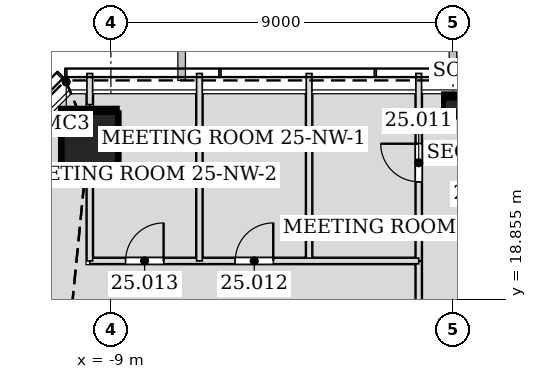
"""IFC4 building model, lengths in metres.
Left out: names, types, materials, properties, quantities, classifications, styles, units other than length and angle.
Written with IfcOpenShell. Run it as: python <this file> out.ifc"""

import sys

from ifc_helpers import new_model, si_unit, direction, frame, frame_2d, origin, origin_2d, place, context, subcontext, project, spatial, rectangle, hollow_rectangle, extrude, element, fill, save


model = new_model("IFC4")
c1 = context("Model", 3, precision=1e-05, world=origin(), true_north=direction((0.0, 1.0)))
c2 = subcontext(c1, "Body", "Model", "MODEL_VIEW")
j1 = project(units=[si_unit("LENGTHUNIT", "METRE"), si_unit("PLANEANGLEUNIT", "RADIAN")], contexts=[c1])
p1 = place(None, origin())
s1 = spatial("IfcSite", under=j1, at=p1, CompositionType="ELEMENT")
p2 = place(p1, origin())
s2 = spatial("IfcBuilding", under=s1, at=p2, CompositionType="ELEMENT")
p3 = place(p2, frame((0.0, 0.0, 113.4)))
s3 = spatial("IfcBuildingStorey", under=s2, at=p3, CompositionType="ELEMENT", Elevation=113.4)
p4 = place(p3, frame((-9.58, 23.129, 0.0), z_axis=(0.011677854952, -0.028294106277, 0.999531425846), x_axis=(0.924363308851, 0.38151339852, 0.0)))
e1 = element("IfcColumn", 1, at=p4, inside=s3, PredefinedType="COLUMN", context=c2, shape_type="SweptSolid", body=[
    extrude(hollow_rectangle(XDim=1.5, YDim=1.5, WallThickness=0.07, at=origin_2d()), origin(), (0.0, 0.0, 1.0), 4.202),
])
p5 = place(p3, frame((0.0, 24.007, 0.0), z_axis=(0.0, -0.02829603574, 0.999599587015), x_axis=(1.0, 0.0, 0.0)))
e2 = element("IfcColumn", 2, at=p5, inside=s3, PredefinedType="COLUMN", context=c2, shape_type="SweptSolid", body=[
    extrude(hollow_rectangle(XDim=0.5, YDim=0.5, WallThickness=0.025, at=origin_2d()), origin(), (0.0, 0.0, 1.0), 4.202),
])
p6 = place(p3, frame((-0.9, 24.791, 0.0), z_axis=(0.0, 0.0, 1.0), x_axis=(0.0, -1.0, 0.0)))
e3 = element("IfcWall", 3, at=p6, inside=s3, PredefinedType="PARTITIONING", context=c2, shape_type="SweptSolid", body=[
    extrude(rectangle(XDim=4.935, YDim=0.15, at=frame_2d((2.468, 0.0))), origin(), (0.0, 0.0, 1.0), 3.492),
])
p7 = place(p6, frame((1.85, 0.0, 0.0)))
e4 = element("IfcOpeningElement", 4, at=p7, cuts=e3, PredefinedType="OPENING", context=c2, shape_type="SweptSolid", body=[
    extrude(rectangle(XDim=1.0, YDim=2.1, at=frame_2d((0.5, 1.05))), frame((0.0, 0.085, 0.0), z_axis=(0.0, -1.0, 0.0), x_axis=(1.0, 0.0, 0.0)), (0.0, 0.0, 1.0), 0.17),
])
p8 = place(p3, frame((-0.9, 19.858, 0.0), z_axis=(0.0, 0.0, 1.0), x_axis=(0.0, -1.0, 0.0)))
e5 = element("IfcWall", 5, at=p8, inside=s3, PredefinedType="PARTITIONING", context=c2, shape_type="SweptSolid", body=[
    extrude(rectangle(XDim=6.808, YDim=0.15, at=frame_2d((3.404, 0.0))), origin(), (0.0, 0.0, 1.0), 3.426),
])
p9 = place(p3, frame((-3.785, 24.789, 0.0), z_axis=(0.0, 0.0, 1.0), x_axis=(0.0, -1.0, 0.0)))
e6 = element("IfcWall", 6, at=p9, inside=s3, PredefinedType="PARTITIONING", context=c2, shape_type="SweptSolid", body=[
    extrude(rectangle(XDim=4.932, YDim=0.15, at=frame_2d((2.466, 0.0))), origin(), (0.0, 0.0, 1.0), 3.492),
])
p10 = place(p3, frame((-0.9, 19.857, 0.0), z_axis=(0.0, 0.0, 1.0), x_axis=(-1.0, 0.0, 0.0)))
e7 = element("IfcWall", 7, at=p10, inside=s3, PredefinedType="PARTITIONING", context=c2, shape_type="SweptSolid", body=[
    extrude(rectangle(XDim=8.656, YDim=0.15, at=frame_2d((4.328, 0.0))), origin(), (0.0, 0.0, 1.0), 4.035),
])
p11 = place(p10, frame((3.828, 0.0, 0.0)))
e8 = element("IfcOpeningElement", 8, at=p11, cuts=e7, PredefinedType="OPENING", context=c2, shape_type="SweptSolid", body=[
    extrude(rectangle(XDim=1.0, YDim=2.1, at=frame_2d((0.5, 1.05))), frame((0.0, 0.085, 0.0), z_axis=(0.0, -1.0, 0.0), x_axis=(1.0, 0.0, 0.0)), (0.0, 0.0, 1.0), 0.17),
])
p12 = place(p10, frame((6.713, 0.0, 0.0)))
e9 = element("IfcOpeningElement", 9, at=p12, cuts=e7, PredefinedType="OPENING", context=c2, shape_type="SweptSolid", body=[
    extrude(rectangle(XDim=1.0, YDim=2.1, at=frame_2d((0.5, 1.05))), frame((0.0, 0.085, 0.0), z_axis=(0.0, -1.0, 0.0), x_axis=(1.0, 0.0, 0.0)), (0.0, 0.0, 1.0), 0.17),
])
p13 = place(p3, frame((-6.671, 24.789, 0.0), z_axis=(0.0, 0.0, 1.0), x_axis=(0.0, -1.0, 0.0)))
e10 = element("IfcWall", 10, at=p13, inside=s3, PredefinedType="PARTITIONING", context=c2, shape_type="SweptSolid", body=[
    extrude(rectangle(XDim=4.932, YDim=0.15, at=frame_2d((2.466, 0.0))), origin(), (0.0, 0.0, 1.0), 3.492),
])
p14 = place(p3, frame((-9.556, 24.789, 0.0), z_axis=(0.0, 0.0, 1.0), x_axis=(0.0, -1.0, 0.0)))
e11 = element("IfcWall", 11, at=p14, inside=s3, PredefinedType="PARTITIONING", context=c2, shape_type="SweptSolid", body=[
    extrude(rectangle(XDim=0.818, YDim=0.15, at=frame_2d((0.409, 0.0))), origin(), (0.0, 0.0, 1.0), 4.035),
])
p15 = place(p3, frame((-9.556, 22.167, 0.0), z_axis=(0.0, 0.0, 1.0), x_axis=(0.0, -1.0, 0.0)))
e12 = element("IfcWall", 12, at=p15, inside=s3, PredefinedType="PARTITIONING", context=c2, shape_type="SweptSolid", body=[
    extrude(rectangle(XDim=2.31, YDim=0.15, at=frame_2d((1.155, 0.0))), origin(), (0.0, 0.0, 1.0), 3.098),
])
p16 = place(p7, frame((1.0, 0.0, 0.0), z_axis=(0.0, 0.0, 1.0), x_axis=(-1.0, 0.0, 0.0)))
e13 = element("IfcDoor", 13, at=p16, inside=s3, OperationType="SINGLE_SWING_RIGHT", PredefinedType="DOOR", context=c2, shape_type="SweptSolid", body=[
    extrude(rectangle(XDim=1.0, YDim=2.1, at=frame_2d((0.5, 1.05))), frame((0.0, 0.025, 0.0), z_axis=(0.0, -1.0, 0.0), x_axis=(1.0, 0.0, 0.0)), (0.0, 0.0, 1.0), 0.05),
])
fill(e4, e13)
p17 = place(p11, frame((1.0, 0.0, 0.0), z_axis=(0.0, 0.0, 1.0), x_axis=(-1.0, 0.0, 0.0)))
e14 = element("IfcDoor", 14, at=p17, inside=s3, OperationType="SINGLE_SWING_RIGHT", PredefinedType="DOOR", context=c2, shape_type="SweptSolid", body=[
    extrude(rectangle(XDim=1.0, YDim=2.1, at=frame_2d((0.5, 1.05))), frame((0.0, 0.025, 0.0), z_axis=(0.0, -1.0, 0.0), x_axis=(1.0, 0.0, 0.0)), (0.0, 0.0, 1.0), 0.05),
])
fill(e8, e14)
p18 = place(p12, frame((1.0, 0.0, 0.0), z_axis=(0.0, 0.0, 1.0), x_axis=(-1.0, 0.0, 0.0)))
e15 = element("IfcDoor", 15, at=p18, inside=s3, OperationType="SINGLE_SWING_RIGHT", PredefinedType="DOOR", context=c2, shape_type="SweptSolid", body=[
    extrude(rectangle(XDim=1.0, YDim=2.1, at=frame_2d((0.5, 1.05))), frame((0.0, 0.025, 0.0), z_axis=(0.0, -1.0, 0.0), x_axis=(1.0, 0.0, 0.0)), (0.0, 0.0, 1.0), 0.05),
])
fill(e9, e15)
save(model, sys.argv[1])
